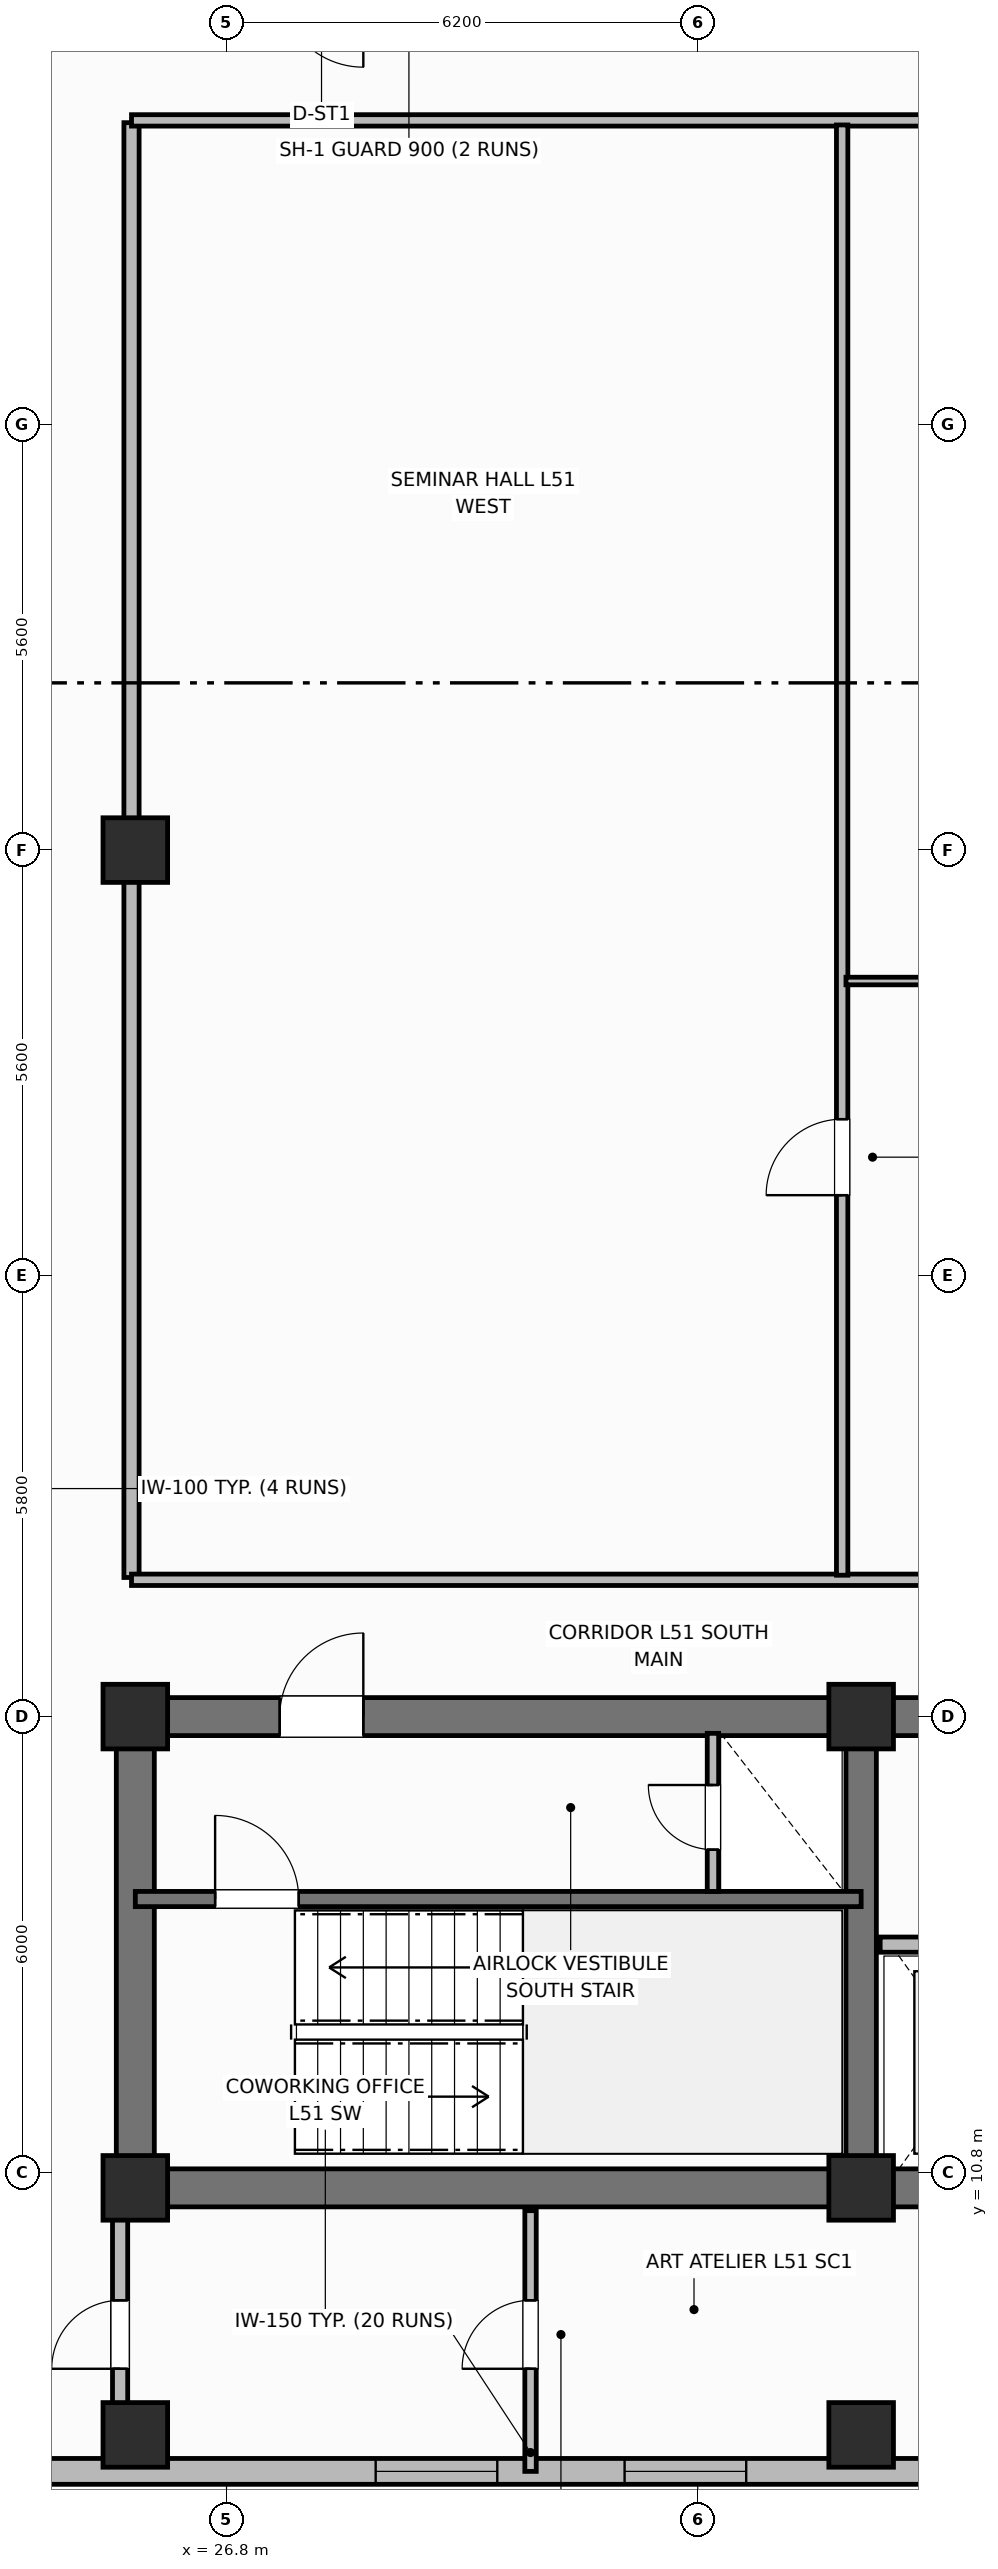
"""IFC4 building model, lengths in metres.
Left out: names, types, materials, properties, quantities, classifications, styles, units other than length and angle.
Written with IfcOpenShell. Run it as: python <this file> out.ifc"""

import sys

from ifc_helpers import new_model, si_unit, direction, frame, frame_2d, origin, origin_2d, place, context, subcontext, project, spatial, rectangle, extrude, element, fill, save


model = new_model("IFC4")
c1 = context("Model", 3, precision=1e-05, world=origin(), true_north=direction((0.0, 1.0)))
c2 = subcontext(c1, "Body", "Model", "MODEL_VIEW")
j1 = project(units=[si_unit("LENGTHUNIT", "METRE"), si_unit("PLANEANGLEUNIT", "RADIAN")], contexts=[c1])
p1 = place(None, origin())
s1 = spatial("IfcSite", under=j1, at=p1, CompositionType="ELEMENT")
p2 = place(p1, origin())
s2 = spatial("IfcBuilding", under=s1, at=p2, CompositionType="ELEMENT")
p3 = place(p2, frame((0.0, 0.0, 207.3)))
s3 = spatial("IfcBuildingStorey", under=s2, at=p3, CompositionType="ELEMENT", Elevation=207.3)
p4 = place(p3, frame((52.8, 10.6, 0.0), z_axis=(0.0, 0.0, 1.0), x_axis=(-1.0, 0.0, 0.0)))
e1 = element("IfcWall", 1, at=p4, inside=s3, PredefinedType="SHEAR", context=c2, shape_type="SweptSolid", body=[
    extrude(rectangle(XDim=27.2, YDim=0.5, at=frame_2d((13.6, 0.0))), origin(), (0.0, 0.0, 1.0), 3.7),
])
p5 = place(p3, frame((25.6, 10.85, 0.0), z_axis=(0.0, 0.0, 1.0), x_axis=(0.0, 1.0, 0.0)))
e2 = element("IfcWall", 2, at=p5, inside=s3, PredefinedType="SHEAR", context=c2, shape_type="SweptSolid", body=[
    extrude(rectangle(XDim=5.7, YDim=0.5, at=frame_2d((2.85, 0.0))), origin(), (0.0, 0.0, 1.0), 3.7),
])
p6 = place(p3, frame((25.6, 16.8, 0.0), z_axis=(0.0, 0.0, 1.0), x_axis=(1.0, 0.0, 0.0)))
e3 = element("IfcWall", 3, at=p6, inside=s3, PredefinedType="SHEAR", context=c2, shape_type="SweptSolid", body=[
    extrude(rectangle(XDim=27.2, YDim=0.5, at=frame_2d((13.6, 0.0))), origin(), (0.0, 0.0, 1.0), 3.7),
])
p7 = place(p6, frame((1.9, 0.0, 0.0)))
e4 = element("IfcOpeningElement", 4, at=p7, cuts=e3, PredefinedType="OPENING", context=c2, shape_type="SweptSolid", body=[
    extrude(rectangle(XDim=1.1, YDim=2.15, at=frame_2d((0.55, 1.075))), frame((0.0, 0.26, 0.0), z_axis=(0.0, -1.0, 0.0), x_axis=(1.0, 0.0, 0.0)), (0.0, 0.0, 1.0), 0.52),
])
p8 = place(p6, frame((13.0, 0.0, 0.0)))
e5 = element("IfcOpeningElement", 5, at=p8, cuts=e3, PredefinedType="OPENING", context=c2, shape_type="SweptSolid", body=[
    extrude(rectangle(XDim=1.2, YDim=2.15, at=frame_2d((0.6, 1.075))), frame((0.0, 0.26, 0.0), z_axis=(0.0, -1.0, 0.0), x_axis=(1.0, 0.0, 0.0)), (0.0, 0.0, 1.0), 0.52),
])
p9 = place(p6, frame((21.6, 0.0, 0.0)))
e6 = element("IfcOpeningElement", 6, at=p9, cuts=e3, PredefinedType="OPENING", context=c2, shape_type="SweptSolid", body=[
    extrude(rectangle(XDim=1.0, YDim=2.15, at=frame_2d((0.5, 1.075))), frame((0.0, 0.26, 0.0), z_axis=(0.0, -1.0, 0.0), x_axis=(1.0, 0.0, 0.0)), (0.0, 0.0, 1.0), 0.52),
])
p10 = place(p3, frame((35.15, 10.85, 0.0), z_axis=(0.0, 0.0, 1.0), x_axis=(0.0, 1.0, 0.0)))
e7 = element("IfcWall", 7, at=p10, inside=s3, PredefinedType="SHEAR", context=c2, shape_type="SweptSolid", body=[
    extrude(rectangle(XDim=5.7, YDim=0.4, at=frame_2d((2.85, 0.0))), origin(), (0.0, 0.0, 1.0), 3.7),
])
for number, where, z_axis, x_axis in (
    (8, (25.6, 10.6, 0.0), (0.0, 0.0, 1.0), (1.0, 0.0, 0.0)),
    (9, (25.6, 16.8, 0.0), (0.0, 0.0, 1.0), (1.0, 0.0, 0.0)),
    (10, (35.15, 10.6, 0.0), (0.0, 0.0, 1.0), (1.0, 0.0, 0.0)),
    (11, (35.15, 16.8, 0.0), (0.0, 0.0, 1.0), (1.0, 0.0, 0.0)),
    (12, (25.6, 28.2, 0.0), (0.0, 0.0, 1.0), (1.0, 0.0, 0.0)),
    (13, (25.6, 7.35, 0.0), (0.0, 0.0, 1.0), (1.0, 0.0, 0.0)),
    (14, (35.15, 7.35, 0.0), (0.0, 0.0, 1.0), (1.0, 0.0, 0.0)),
):
    element("IfcColumn", number, at=place(p3, frame(where, z_axis=z_axis, x_axis=x_axis)), inside=s3, PredefinedType="COLUMN", context=c2, shape_type="SweptSolid", body=[
        extrude(rectangle(XDim=0.85, YDim=0.85, at=origin_2d()), origin(), (0.0, 0.0, 1.0), 3.7),
    ])
p11 = place(p3, frame((20.2, 6.87, 0.0), z_axis=(0.0, 0.0, 1.0), x_axis=(1.0, 0.0, 0.0)))
e15 = element("IfcWall", 15, at=p11, inside=s3, PredefinedType="SOLIDWALL", context=c2, shape_type="SweptSolid", body=[
    extrude(rectangle(XDim=15.8, YDim=0.34, at=frame_2d((7.9, 0.0))), origin(), (0.0, 0.0, 1.0), 2.72),
])
p12 = place(p11, frame((0.962, 0.0, 0.7)))
e16 = element("IfcOpeningElement", 16, at=p12, cuts=e15, PredefinedType="OPENING", context=c2, shape_type="SweptSolid", body=[
    extrude(rectangle(XDim=1.6, YDim=1.9, at=frame_2d((0.8, 0.95))), frame((0.0, 0.18, 0.0), z_axis=(0.0, -1.0, 0.0), x_axis=(1.0, 0.0, 0.0)), (0.0, 0.0, 1.0), 0.36),
])
p13 = place(p11, frame((8.562, 0.0, 0.7)))
e17 = element("IfcOpeningElement", 17, at=p13, cuts=e15, PredefinedType="OPENING", context=c2, shape_type="SweptSolid", body=[
    extrude(rectangle(XDim=1.6, YDim=1.9, at=frame_2d((0.8, 0.95))), frame((0.0, 0.18, 0.0), z_axis=(0.0, -1.0, 0.0), x_axis=(1.0, 0.0, 0.0)), (0.0, 0.0, 1.0), 0.36),
])
p14 = place(p11, frame((11.837, 0.0, 0.7)))
e18 = element("IfcOpeningElement", 18, at=p14, cuts=e15, PredefinedType="OPENING", context=c2, shape_type="SweptSolid", body=[
    extrude(rectangle(XDim=1.6, YDim=1.9, at=frame_2d((0.8, 0.95))), frame((0.0, 0.18, 0.0), z_axis=(0.0, -1.0, 0.0), x_axis=(1.0, 0.0, 0.0)), (0.0, 0.0, 1.0), 0.36),
])
p15 = place(p3, frame((25.6, 14.4, 0.0), z_axis=(0.0, 0.0, 1.0), x_axis=(1.0, 0.0, 0.0)))
e19 = element("IfcWall", 19, at=p15, inside=s3, PredefinedType="SHEAR", context=c2, shape_type="SweptSolid", body=[
    extrude(rectangle(XDim=9.55, YDim=0.2, at=frame_2d((4.775, 0.0))), origin(), (0.0, 0.0, 1.0), 3.7),
])
p16 = place(p15, frame((1.05, 0.0, 0.0)))
e20 = element("IfcOpeningElement", 20, at=p16, cuts=e19, PredefinedType="OPENING", context=c2, shape_type="SweptSolid", body=[
    extrude(rectangle(XDim=1.1, YDim=2.15, at=frame_2d((0.55, 1.075))), frame((0.0, 0.11, 0.0), z_axis=(0.0, -1.0, 0.0), x_axis=(1.0, 0.0, 0.0)), (0.0, 0.0, 1.0), 0.22),
])
p17 = place(p3, frame((33.2, 14.5, 0.0), z_axis=(0.0, 0.0, 1.0), x_axis=(0.0, 1.0, 0.0)))
e21 = element("IfcWall", 21, at=p17, inside=s3, PredefinedType="PARTITIONING", context=c2, shape_type="SweptSolid", body=[
    extrude(rectangle(XDim=2.08, YDim=0.15, at=frame_2d((1.04, 0.0))), origin(), (0.0, 0.0, 1.0), 2.55),
])
p18 = place(p17, frame((0.55, 0.0, 0.0)))
e22 = element("IfcOpeningElement", 22, at=p18, cuts=e21, PredefinedType="OPENING", context=c2, shape_type="SweptSolid", body=[
    extrude(rectangle(XDim=0.85, YDim=2.05, at=frame_2d((0.425, 1.025))), frame((0.0, 0.085, 0.0), z_axis=(0.0, -1.0, 0.0), x_axis=(1.0, 0.0, 0.0)), (0.0, 0.0, 1.0), 0.17),
])
p19 = place(p3, frame((35.4, 13.8, 0.0), z_axis=(0.0, 0.0, 1.0), x_axis=(1.0, 0.0, 0.0)))
e23 = element("IfcWall", 23, at=p19, inside=s3, PredefinedType="PARTITIONING", context=c2, shape_type="SweptSolid", body=[
    extrude(rectangle(XDim=7.6, YDim=0.2, at=frame_2d((3.8, 0.0))), origin(), (0.0, 0.0, 1.0), 2.32),
])
p20 = place(p19, frame((0.7, 0.0, 0.0)))
e24 = element("IfcOpeningElement", 24, at=p20, cuts=e23, PredefinedType="OPENING", context=c2, shape_type="SweptSolid", body=[
    extrude(rectangle(XDim=1.1, YDim=2.15, at=frame_2d((0.55, 1.075))), frame((0.0, 0.11, 0.0), z_axis=(0.0, -1.0, 0.0), x_axis=(1.0, 0.0, 0.0)), (0.0, 0.0, 1.0), 0.22),
])
p21 = place(p19, frame((3.35, 0.0, 0.0)))
e25 = element("IfcOpeningElement", 25, at=p21, cuts=e23, PredefinedType="OPENING", context=c2, shape_type="SweptSolid", body=[
    extrude(rectangle(XDim=1.2, YDim=2.15, at=frame_2d((0.6, 1.075))), frame((0.0, 0.11, 0.0), z_axis=(0.0, -1.0, 0.0), x_axis=(1.0, 0.0, 0.0)), (0.0, 0.0, 1.0), 0.22),
])
p22 = place(p3, frame((25.55, 18.63, 0.0), z_axis=(0.0, 0.0, 1.0), x_axis=(0.0, 1.0, 0.0)))
e26 = element("IfcWall", 26, at=p22, inside=s3, PredefinedType="PARTITIONING", context=c2, shape_type="SweptSolid", body=[
    extrude(rectangle(XDim=19.14, YDim=0.2, at=frame_2d((9.57, 0.0))), origin(), (0.0, 0.0, 1.0), 2.55),
])
for number, where, z_axis, x_axis in (
    (27, (25.55, 18.6, 0.0), (0.0, 0.0, 1.0), (1.0, 0.0, 0.0)),
    (28, (25.55, 37.8, 0.0), (0.0, 0.0, 1.0), (1.0, 0.0, 0.0)),
):
    element("IfcWall", number, at=place(p3, frame(where, z_axis=z_axis, x_axis=x_axis)), inside=s3, PredefinedType="PARTITIONING", context=c2, shape_type="SweptSolid", body=[
        extrude(rectangle(XDim=22.2, YDim=0.15, at=frame_2d((11.1, 0.0))), origin(), (0.0, 0.0, 1.0), 2.55),
    ])
p23 = place(p3, frame((34.9, 18.66, 0.0), z_axis=(0.0, 0.0, 1.0), x_axis=(0.0, 1.0, 0.0)))
e29 = element("IfcWall", 29, at=p23, inside=s3, PredefinedType="PARTITIONING", context=c2, shape_type="SweptSolid", body=[
    extrude(rectangle(XDim=19.08, YDim=0.15, at=frame_2d((9.54, 0.0))), origin(), (0.0, 0.0, 1.0), 2.55),
])
p24 = place(p23, frame((5.0, 0.0, 0.0)))
e30 = element("IfcOpeningElement", 30, at=p24, cuts=e29, PredefinedType="OPENING", context=c2, shape_type="SweptSolid", body=[
    extrude(rectangle(XDim=1.0, YDim=2.15, at=frame_2d((0.5, 1.075))), frame((0.0, 0.085, 0.0), z_axis=(0.0, -1.0, 0.0), x_axis=(1.0, 0.0, 0.0)), (0.0, 0.0, 1.0), 0.17),
])
p25 = place(p3, frame((34.95, 26.477, 0.0), z_axis=(0.0, 0.0, 1.0), x_axis=(1.0, 0.0, 0.0)))
e31 = element("IfcWall", 31, at=p25, inside=s3, PredefinedType="PARTITIONING", context=c2, shape_type="SweptSolid", body=[
    extrude(rectangle(XDim=12.81, YDim=0.1, at=frame_2d((6.405, 0.0))), origin(), (0.0, 0.0, 1.0), 2.55),
])
p26 = place(p3, frame((30.8, 6.87, 0.0), z_axis=(0.0, 0.0, 1.0), x_axis=(0.0, 1.0, 0.0)))
e32 = element("IfcWall", 32, at=p26, inside=s3, PredefinedType="PARTITIONING", context=c2, shape_type="SweptSolid", body=[
    extrude(rectangle(XDim=3.43, YDim=0.15, at=frame_2d((1.715, 0.0))), origin(), (0.0, 0.0, 1.0), 2.55),
])
p27 = place(p26, frame((1.35, 0.0, 0.0)))
e33 = element("IfcOpeningElement", 33, at=p27, cuts=e32, PredefinedType="OPENING", context=c2, shape_type="SweptSolid", body=[
    extrude(rectangle(XDim=0.9, YDim=2.1, at=frame_2d((0.45, 1.05))), frame((0.0, 0.085, 0.0), z_axis=(0.0, -1.0, 0.0), x_axis=(1.0, 0.0, 0.0)), (0.0, 0.0, 1.0), 0.17),
])
p28 = place(p3, frame((25.4, 7.57, 0.0), z_axis=(0.0, 0.0, 1.0), x_axis=(0.0, 1.0, 0.0)))
e34 = element("IfcWall", 34, at=p28, inside=s3, PredefinedType="PARTITIONING", context=c2, shape_type="SweptSolid", body=[
    extrude(rectangle(XDim=2.73, YDim=0.2, at=frame_2d((1.365, 0.0))), origin(), (0.0, 0.0, 1.0), 2.55),
])
p29 = place(p28, frame((0.65, 0.0, 0.0)))
e35 = element("IfcOpeningElement", 35, at=p29, cuts=e34, PredefinedType="OPENING", context=c2, shape_type="SweptSolid", body=[
    extrude(rectangle(XDim=0.9, YDim=2.1, at=frame_2d((0.45, 1.05))), frame((0.0, 0.11, 0.0), z_axis=(0.0, -1.0, 0.0), x_axis=(1.0, 0.0, 0.0)), (0.0, 0.0, 1.0), 0.22),
])
p30 = place(p13, origin())
e36 = element("IfcWindow", 36, at=p30, inside=s3, PartitioningType="SINGLE_PANEL", PredefinedType="WINDOW", context=c2, shape_type="SweptSolid", body=[
    extrude(rectangle(XDim=1.6, YDim=1.9, at=frame_2d((0.8, 0.95))), frame((0.0, 0.03, 0.0), z_axis=(0.0, -1.0, 0.0), x_axis=(1.0, 0.0, 0.0)), (0.0, 0.0, 1.0), 0.06),
])
fill(e17, e36)
p31 = place(p14, origin())
e37 = element("IfcWindow", 37, at=p31, inside=s3, PartitioningType="SINGLE_PANEL", PredefinedType="WINDOW", context=c2, shape_type="SweptSolid", body=[
    extrude(rectangle(XDim=1.6, YDim=1.9, at=frame_2d((0.8, 0.95))), frame((0.0, 0.03, 0.0), z_axis=(0.0, -1.0, 0.0), x_axis=(1.0, 0.0, 0.0)), (0.0, 0.0, 1.0), 0.06),
])
fill(e18, e37)
p32 = place(p16, origin())
e38 = element("IfcDoor", 38, at=p32, inside=s3, OperationType="SINGLE_SWING_LEFT", PredefinedType="DOOR", context=c2, shape_type="SweptSolid", body=[
    extrude(rectangle(XDim=1.1, YDim=2.15, at=frame_2d((0.55, 1.075))), frame((0.0, 0.025, 0.0), z_axis=(0.0, -1.0, 0.0), x_axis=(1.0, 0.0, 0.0)), (0.0, 0.0, 1.0), 0.05),
])
fill(e20, e38)
p33 = place(p18, origin())
e39 = element("IfcDoor", 39, at=p33, inside=s3, OperationType="SINGLE_SWING_RIGHT", PredefinedType="TRAPDOOR", context=c2, shape_type="SweptSolid", body=[
    extrude(rectangle(XDim=0.85, YDim=2.05, at=frame_2d((0.425, 1.025))), frame((0.0, 0.025, 0.0), z_axis=(0.0, -1.0, 0.0), x_axis=(1.0, 0.0, 0.0)), (0.0, 0.0, 1.0), 0.05),
])
fill(e22, e39)
p34 = place(p24, origin())
e40 = element("IfcDoor", 40, at=p34, inside=s3, OperationType="SINGLE_SWING_LEFT", PredefinedType="DOOR", context=c2, shape_type="SweptSolid", body=[
    extrude(rectangle(XDim=1.0, YDim=2.15, at=frame_2d((0.5, 1.075))), frame((0.0, 0.025, 0.0), z_axis=(0.0, -1.0, 0.0), x_axis=(1.0, 0.0, 0.0)), (0.0, 0.0, 1.0), 0.05),
])
fill(e30, e40)
p35 = place(p27, origin())
e41 = element("IfcDoor", 41, at=p35, inside=s3, OperationType="SINGLE_SWING_LEFT", PredefinedType="DOOR", context=c2, shape_type="SweptSolid", body=[
    extrude(rectangle(XDim=0.9, YDim=2.1, at=frame_2d((0.45, 1.05))), frame((0.0, 0.025, 0.0), z_axis=(0.0, -1.0, 0.0), x_axis=(1.0, 0.0, 0.0)), (0.0, 0.0, 1.0), 0.05),
])
fill(e33, e41)
p36 = place(p29, origin())
e42 = element("IfcDoor", 42, at=p36, inside=s3, OperationType="SINGLE_SWING_LEFT", PredefinedType="DOOR", context=c2, shape_type="SweptSolid", body=[
    extrude(rectangle(XDim=0.9, YDim=2.1, at=frame_2d((0.45, 1.05))), frame((0.0, 0.025, 0.0), z_axis=(0.0, -1.0, 0.0), x_axis=(1.0, 0.0, 0.0)), (0.0, 0.0, 1.0), 0.05),
])
fill(e35, e42)
p37 = place(p7, origin())
e43 = element("IfcDoor", 43, at=p37, inside=s3, OperationType="SINGLE_SWING_RIGHT", PredefinedType="DOOR", context=c2, shape_type="SweptSolid", body=[
    extrude(rectangle(XDim=1.1, YDim=2.15, at=frame_2d((0.55, 1.075))), frame((0.0, 0.025, 0.0), z_axis=(0.0, -1.0, 0.0), x_axis=(1.0, 0.0, 0.0)), (0.0, 0.0, 1.0), 0.05),
])
fill(e4, e43)
save(model, sys.argv[1])
